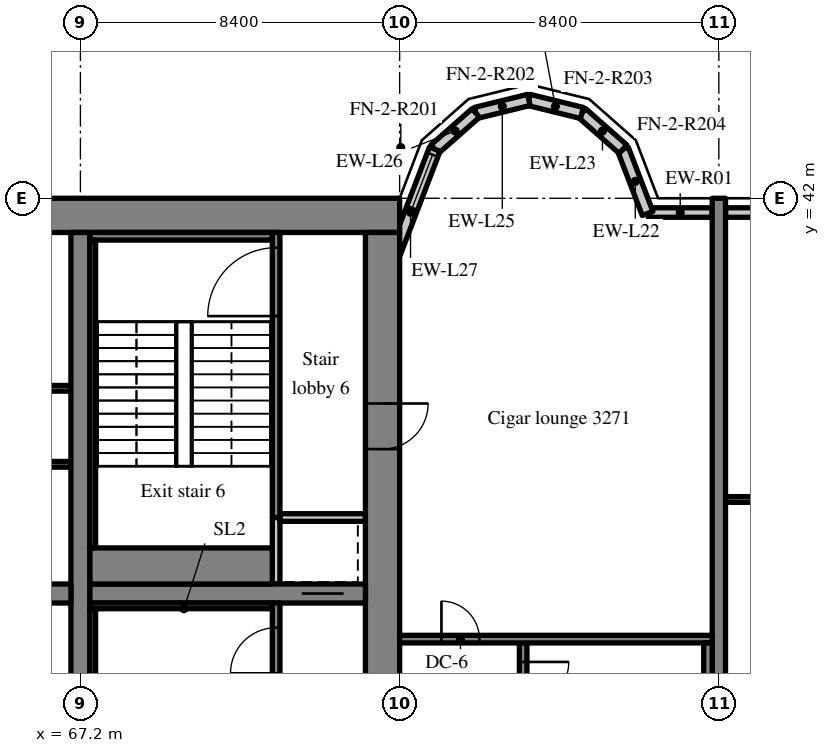
"""IFC4 building model, lengths in metres.
Left out: names, types, materials, properties, quantities, classifications, styles, units other than length and angle.
Written with IfcOpenShell. Run it as: python <this file> out.ifc"""

import sys

from ifc_helpers import new_model, si_unit, direction, frame, frame_2d, origin, place, context, subcontext, project, spatial, rectangle, extrude, source, transform, mapped, element, fill, save


model = new_model("IFC4")
c1 = context("Model", 3, precision=1e-05, world=origin(), true_north=direction((0.0, 1.0)))
c2 = subcontext(c1, "Body", "Model", "MODEL_VIEW")
j1 = project(units=[si_unit("LENGTHUNIT", "METRE"), si_unit("PLANEANGLEUNIT", "RADIAN")], contexts=[c1])
p1 = place(None, origin())
s1 = spatial("IfcSite", under=j1, at=p1, CompositionType="ELEMENT")
p2 = place(p1, origin())
s2 = spatial("IfcBuilding", under=s1, at=p2, CompositionType="ELEMENT")
p3 = place(p2, frame((0.0, 0.0, 133.2)))
s3 = spatial("IfcBuildingStorey", under=s2, at=p3, CompositionType="ELEMENT", Elevation=133.2)
m1 = source(origin(), c2, "Body", "SweptSolid", [
    extrude(rectangle(XDim=50.4, YDim=0.9, at=frame_2d((25.2, 0.0))), origin(), (0.0, 0.0, 1.0), 3.52),
])
p4 = place(p3, frame((25.2, 41.55, 0.0), z_axis=(0.0, 0.0, 1.0), x_axis=(1.0, 0.0, 0.0)))
e1 = element("IfcWall", 1, at=p4, inside=s3, PredefinedType="SHEAR", context=c2, shape_type="MappedRepresentation", body=[
    mapped(m1, transform((0.0, 0.0, 0.0), scale=1.0)),
])
m2 = source(origin(), c2, "Body", "SweptSolid", [
    extrude(rectangle(XDim=18.2, YDim=0.9, at=frame_2d((9.1, 0.0))), origin(), (0.0, 0.0, 1.0), 3.52),
])
p5 = place(p3, frame((75.15, 22.9, 0.0), z_axis=(0.0, 0.0, 1.0), x_axis=(0.0, 1.0, 0.0)))
e2 = element("IfcWall", 2, at=p5, inside=s3, PredefinedType="SHEAR", context=c2, shape_type="MappedRepresentation", body=[
    mapped(m2, transform((0.0, 0.0, 0.0), scale=1.0)),
])
m3 = source(origin(), c2, "Body", "SweptSolid", [
    extrude(rectangle(XDim=1.2, YDim=2.1, at=frame_2d((0.6, 1.05))), frame((0.0, 0.46, 0.0), z_axis=(0.0, -1.0, 0.0), x_axis=(1.0, 0.0, 0.0)), (0.0, 0.0, 1.0), 0.92),
])
p6 = place(p5, frame((12.5, 0.0, 0.0)))
e3 = element("IfcOpeningElement", 3, at=p6, cuts=e2, PredefinedType="OPENING", context=c2, shape_type="MappedRepresentation", body=[
    mapped(m3, transform((0.0, 0.0, 0.0), scale=1.0)),
])
m4 = source(origin(), c2, "Body", "SweptSolid", [
    extrude(rectangle(XDim=18.2, YDim=0.5, at=frame_2d((9.1, 0.0))), origin(), (0.0, 0.0, 1.0), 3.52),
])
p7 = place(p3, frame((67.2, 22.9, 0.0), z_axis=(0.0, 0.0, 1.0), x_axis=(0.0, 1.0, 0.0)))
e4 = element("IfcWall", 4, at=p7, inside=s3, PredefinedType="SHEAR", context=c2, shape_type="MappedRepresentation", body=[
    mapped(m4, transform((0.0, 0.0, 0.0), scale=1.0)),
])
m5 = source(origin(), c2, "Body", "SweptSolid", [
    extrude(rectangle(XDim=16.3, YDim=0.5, at=frame_2d((8.15, 0.0))), origin(), (0.0, 0.0, 1.0), 3.52),
])
p8 = place(p3, frame((50.65, 31.6, 0.0), z_axis=(0.0, 0.0, 1.0), x_axis=(1.0, 0.0, 0.0)))
e5 = element("IfcWall", 5, at=p8, inside=s3, PredefinedType="SHEAR", context=c2, shape_type="MappedRepresentation", body=[
    mapped(m5, transform((0.0, 0.0, 0.0), scale=1.0)),
])
m6 = source(origin(), c2, "Body", "SweptSolid", [
    extrude(rectangle(XDim=1.0, YDim=2.1, at=frame_2d((0.5, 1.05))), frame((0.0, 0.26, 0.0), z_axis=(0.0, -1.0, 0.0), x_axis=(1.0, 0.0, 0.0)), (0.0, 0.0, 1.0), 0.52),
])
p9 = place(p8, frame((0.575, 0.0, 0.0)))
e6 = element("IfcOpeningElement", 6, at=p9, cuts=e5, PredefinedType="OPENING", context=c2, shape_type="MappedRepresentation", body=[
    mapped(m6, transform((0.0, 0.0, 0.0), scale=1.0)),
])
m7 = source(origin(), c2, "Body", "SweptSolid", [
    extrude(rectangle(XDim=7.25, YDim=0.5, at=frame_2d((3.625, 0.0))), origin(), (0.0, 0.0, 1.0), 3.52),
])
p10 = place(p3, frame((67.45, 31.6, 0.0), z_axis=(0.0, 0.0, 1.0), x_axis=(1.0, 0.0, 0.0)))
e7 = element("IfcWall", 7, at=p10, inside=s3, PredefinedType="SHEAR", context=c2, shape_type="MappedRepresentation", body=[
    mapped(m7, transform((0.0, 0.0, 0.0), scale=1.0)),
])
m8 = source(origin(), c2, "Body", "SweptSolid", [
    extrude(rectangle(XDim=1.1, YDim=2.1, at=frame_2d((0.55, 1.05))), frame((0.0, 0.26, 0.0), z_axis=(0.0, -1.0, 0.0), x_axis=(1.0, 0.0, 0.0)), (0.0, 0.0, 1.0), 0.52),
])
p11 = place(p10, frame((5.575, 0.0, 0.0)))
e8 = element("IfcOpeningElement", 8, at=p11, cuts=e7, PredefinedType="OPENING", context=c2, shape_type="MappedRepresentation", body=[
    mapped(m8, transform((0.0, 0.0, 0.0), scale=1.0)),
])
m9 = source(origin(), c2, "Body", "SweptSolid", [
    extrude(rectangle(XDim=20.0, YDim=0.35, at=frame_2d((10.0, 0.0))), origin(), (0.0, 0.0, 1.0), 3.52),
])
p12 = place(p3, frame((84.0, 22.0, 0.0), z_axis=(0.0, 0.0, 1.0), x_axis=(0.0, 1.0, 0.0)))
e9 = element("IfcWall", 9, at=p12, inside=s3, PredefinedType="SHEAR", context=c2, shape_type="MappedRepresentation", body=[
    mapped(m9, transform((0.0, 0.0, 0.0), scale=1.0)),
])
m10 = source(origin(), c2, "Body", "SweptSolid", [
    extrude(rectangle(XDim=1.683, YDim=0.25, at=frame_2d((0.841, 0.0))), origin(), (0.0, 0.0, 1.0), 2.82),
])
p13 = place(p3, frame((83.825, 41.625, 0.0), z_axis=(0.0, 0.0, 1.0), x_axis=(-1.0, 0.0, 0.0)))
e10 = element("IfcWall", 10, at=p13, inside=s3, PredefinedType="SOLIDWALL", context=c2, shape_type="MappedRepresentation", body=[
    mapped(m10, transform((0.0, 0.0, 0.0), scale=1.0)),
])
m11 = source(origin(), c2, "Body", "SweptSolid", [
    extrude(rectangle(XDim=3.675, YDim=0.25, at=frame_2d((1.837, 0.0))), origin(), (0.0, 0.0, 1.0), 2.82),
])
p14 = place(p3, frame((87.85, 41.625, 0.0), z_axis=(0.0, 0.0, 1.0), x_axis=(-1.0, 0.0, 0.0)))
e11 = element("IfcWall", 11, at=p14, inside=s3, PredefinedType="SOLIDWALL", context=c2, shape_type="MappedRepresentation", body=[
    mapped(m11, transform((0.0, 0.0, 0.0), scale=1.0)),
])
m12 = source(origin(), c2, "Body", "SweptSolid", [
    extrude(rectangle(XDim=1.5, YDim=1.5, at=frame_2d((0.75, 0.75))), frame((0.0, 0.135, 0.0), z_axis=(0.0, -1.0, 0.0), x_axis=(1.0, 0.0, 0.0)), (0.0, 0.0, 1.0), 0.27),
])
p15 = place(p14, frame((1.087, 0.0, 0.9)))
e12 = element("IfcOpeningElement", 12, at=p15, cuts=e11, PredefinedType="OPENING", context=c2, shape_type="MappedRepresentation", body=[
    mapped(m12, transform((0.0, 0.0, 0.0), scale=1.0)),
])
m13 = source(origin(), c2, "Body", "SweptSolid", [
    extrude(rectangle(XDim=1.812, YDim=0.3, at=frame_2d((0.906, 0.0))), origin(), (0.0, 0.0, 1.0), 3.52),
])
p16 = place(p3, frame((82.125, 41.6, 0.0), z_axis=(0.0, 0.0, 1.0), x_axis=(-0.357877270961, 0.93376863244, 0.0)))
e13 = element("IfcWall", 13, at=p16, inside=s3, PredefinedType="SOLIDWALL", context=c2, shape_type="MappedRepresentation", body=[
    mapped(m13, transform((0.0, 0.0, 0.0), scale=1.0)),
])
m14 = source(origin(), c2, "Body", "SweptSolid", [
    extrude(rectangle(XDim=1.44, YDim=0.3, at=frame_2d((0.72, 0.0))), origin(), (0.0, 0.0, 1.0), 3.52),
])
p17 = place(p3, frame((81.477, 43.292, 0.0), z_axis=(0.0, 0.0, 1.0), x_axis=(-0.74957555648, 0.661918790432, 0.0)))
e14 = element("IfcWall", 14, at=p17, inside=s3, PredefinedType="SOLIDWALL", context=c2, shape_type="MappedRepresentation", body=[
    mapped(m14, transform((0.0, 0.0, 0.0), scale=1.0)),
])
m15 = source(origin(), c2, "Body", "SweptSolid", [
    extrude(rectangle(XDim=1.439, YDim=0.3, at=frame_2d((0.719, 0.0))), origin(), (0.0, 0.0, 1.0), 3.52),
])
for number, where, z_axis, x_axis in (
    (15, (80.397, 44.245, 0.0), (0.0, 0.0, 1.0), (-0.971, 0.238, 0.0)),
    (16, (79.0, 44.588, 0.0), (0.0, 0.0, 1.0), (-0.971, -0.238, 0.0)),
):
    element("IfcWall", number, at=place(p3, frame(where, z_axis=z_axis, x_axis=x_axis)), inside=s3, PredefinedType="SOLIDWALL", context=c2, shape_type="MappedRepresentation", body=[
        mapped(m15, transform((0.0, 0.0, 0.0), scale=1.0)),
    ])
p18 = place(p3, frame((77.603, 44.245, 0.0), z_axis=(0.0, 0.0, 1.0), x_axis=(-0.74957555648, -0.661918790432, 0.0)))
e17 = element("IfcWall", 17, at=p18, inside=s3, PredefinedType="SOLIDWALL", context=c2, shape_type="MappedRepresentation", body=[
    mapped(m14, transform((0.0, 0.0, 0.0), scale=1.0)),
])
m16 = source(origin(), c2, "Body", "SweptSolid", [
    extrude(rectangle(XDim=3.559, YDim=0.3, at=frame_2d((1.78, 0.0))), origin(), (0.0, 0.0, 1.0), 3.52),
])
p19 = place(p3, frame((76.523, 43.292, 0.0), z_axis=(0.0, 0.0, 1.0), x_axis=(-0.35779745313, -0.933799219604, 0.0)))
e18 = element("IfcWall", 18, at=p19, inside=s3, PredefinedType="SOLIDWALL", context=c2, shape_type="MappedRepresentation", body=[
    mapped(m16, transform((0.0, 0.0, 0.0), scale=1.0)),
])
m17 = source(origin(), c2, "Body", "SweptSolid", [
    extrude(rectangle(XDim=1.5, YDim=2.0, at=frame_2d((0.75, 1.0))), frame((0.0, 0.16, 0.0), z_axis=(0.0, -1.0, 0.0), x_axis=(1.0, 0.0, 0.0)), (0.0, 0.0, 1.0), 0.32),
])
p20 = place(p19, frame((0.156, 0.0, 0.9)))
e19 = element("IfcOpeningElement", 19, at=p20, cuts=e18, PredefinedType="OPENING", context=c2, shape_type="MappedRepresentation", body=[
    mapped(m17, transform((0.0, 0.0, 0.0), scale=1.0)),
])
m18 = source(origin(), c2, "Body", "SweptSolid", [
    extrude(rectangle(XDim=14.15, YDim=0.15, at=frame_2d((7.075, 0.0))), origin(), (0.0, 0.0, 1.0), 3.52),
])
p21 = place(p3, frame((66.95, 35.0, 0.0), z_axis=(0.0, 0.0, 1.0), x_axis=(-1.0, 0.0, 0.0)))
e20 = element("IfcWall", 20, at=p21, inside=s3, PredefinedType="PARTITIONING", context=c2, shape_type="MappedRepresentation", body=[
    mapped(m18, transform((0.0, 0.0, 0.0), scale=1.0)),
])
m19 = source(origin(), c2, "Body", "SweptSolid", [
    extrude(rectangle(XDim=0.9, YDim=2.1, at=frame_2d((0.45, 1.05))), frame((0.0, 0.085, 0.0), z_axis=(0.0, -1.0, 0.0), x_axis=(1.0, 0.0, 0.0)), (0.0, 0.0, 1.0), 0.17),
])
p22 = place(p21, frame((0.958, 0.0, 0.0)))
e21 = element("IfcOpeningElement", 21, at=p22, cuts=e20, PredefinedType="OPENING", context=c2, shape_type="MappedRepresentation", body=[
    mapped(m19, transform((0.0, 0.0, 0.0), scale=1.0)),
])
p23 = place(p21, frame((5.884, 0.0, 0.0)))
e22 = element("IfcOpeningElement", 22, at=p23, cuts=e20, PredefinedType="OPENING", context=c2, shape_type="MappedRepresentation", body=[
    mapped(m19, transform((0.0, 0.0, 0.0), scale=1.0)),
])
p24 = place(p21, frame((11.514, 0.0, 0.0)))
e23 = element("IfcOpeningElement", 23, at=p24, cuts=e20, PredefinedType="OPENING", context=c2, shape_type="MappedRepresentation", body=[
    mapped(m19, transform((0.0, 0.0, 0.0), scale=1.0)),
])
m20 = source(origin(), c2, "Body", "SweptSolid", [
    extrude(rectangle(XDim=16.3, YDim=0.15, at=frame_2d((8.15, 0.0))), origin(), (0.0, 0.0, 1.0), 3.52),
])
p25 = place(p3, frame((66.95, 37.0, 0.0), z_axis=(0.0, 0.0, 1.0), x_axis=(-1.0, 0.0, 0.0)))
e24 = element("IfcWall", 24, at=p25, inside=s3, PredefinedType="PARTITIONING", context=c2, shape_type="MappedRepresentation", body=[
    mapped(m20, transform((0.0, 0.0, 0.0), scale=1.0)),
])
p26 = place(p25, frame((0.773, 0.0, 0.0)))
e25 = element("IfcOpeningElement", 25, at=p26, cuts=e24, PredefinedType="OPENING", context=c2, shape_type="MappedRepresentation", body=[
    mapped(m19, transform((0.0, 0.0, 0.0), scale=1.0)),
])
p27 = place(p25, frame((3.625, 0.0, 0.0)))
e26 = element("IfcOpeningElement", 26, at=p27, cuts=e24, PredefinedType="OPENING", context=c2, shape_type="MappedRepresentation", body=[
    mapped(m19, transform((0.0, 0.0, 0.0), scale=1.0)),
])
p28 = place(p25, frame((9.33, 0.0, 0.0)))
e27 = element("IfcOpeningElement", 27, at=p28, cuts=e24, PredefinedType="OPENING", context=c2, shape_type="MappedRepresentation", body=[
    mapped(m19, transform((0.0, 0.0, 0.0), scale=1.0)),
])
p29 = place(p25, frame((14.627, 0.0, 0.0)))
e28 = element("IfcOpeningElement", 28, at=p29, cuts=e24, PredefinedType="OPENING", context=c2, shape_type="MappedRepresentation", body=[
    mapped(m19, transform((0.0, 0.0, 0.0), scale=1.0)),
])
m21 = source(origin(), c2, "Body", "SweptSolid", [
    extrude(rectangle(XDim=8.45, YDim=0.2, at=frame_2d((4.225, 0.0))), origin(), (0.0, 0.0, 1.0), 3.52),
])
p30 = place(p3, frame((72.35, 22.9, 0.0), z_axis=(0.0, 0.0, 1.0), x_axis=(0.0, 1.0, 0.0)))
e29 = element("IfcWall", 29, at=p30, inside=s3, PredefinedType="SOLIDWALL", context=c2, shape_type="MappedRepresentation", body=[
    mapped(m21, transform((0.0, 0.0, 0.0), scale=1.0)),
])
m22 = source(origin(), c2, "Body", "SweptSolid", [
    extrude(rectangle(XDim=1.2, YDim=2.1, at=frame_2d((0.6, 1.05))), frame((0.0, 0.11, 0.0), z_axis=(0.0, -1.0, 0.0), x_axis=(1.0, 0.0, 0.0)), (0.0, 0.0, 1.0), 0.22),
])
p31 = place(p30, frame((6.6, 0.0, 0.0)))
e30 = element("IfcOpeningElement", 30, at=p31, cuts=e29, PredefinedType="OPENING", context=c2, shape_type="MappedRepresentation", body=[
    mapped(m22, transform((0.0, 0.0, 0.0), scale=1.0)),
])
m23 = source(origin(), c2, "Body", "SweptSolid", [
    extrude(rectangle(XDim=1.75, YDim=0.2, at=frame_2d((0.875, 0.0))), origin(), (0.0, 0.0, 1.0), 3.52),
])
p32 = place(p3, frame((72.35, 31.85, 0.0), z_axis=(0.0, 0.0, 1.0), x_axis=(0.0, 1.0, 0.0)))
e31 = element("IfcWall", 31, at=p32, inside=s3, PredefinedType="SOLIDWALL", context=c2, shape_type="MappedRepresentation", body=[
    mapped(m23, transform((0.0, 0.0, 0.0), scale=1.0)),
])
m24 = source(origin(), c2, "Body", "SweptSolid", [
    extrude(rectangle(XDim=2.25, YDim=0.2, at=frame_2d((1.125, 0.0))), origin(), (0.0, 0.0, 1.0), 3.52),
])
p33 = place(p3, frame((72.45, 33.6, 0.0), z_axis=(0.0, 0.0, 1.0), x_axis=(1.0, 0.0, 0.0)))
e32 = element("IfcWall", 32, at=p33, inside=s3, PredefinedType="SOLIDWALL", context=c2, shape_type="MappedRepresentation", body=[
    mapped(m24, transform((0.0, 0.0, 0.0), scale=1.0)),
])
m25 = source(origin(), c2, "Body", "SweptSolid", [
    extrude(rectangle(XDim=7.5, YDim=0.2, at=frame_2d((3.75, 0.0))), origin(), (0.0, 0.0, 1.0), 3.52),
])
p34 = place(p3, frame((72.35, 33.6, 0.0), z_axis=(0.0, 0.0, 1.0), x_axis=(0.0, 1.0, 0.0)))
e33 = element("IfcWall", 33, at=p34, inside=s3, PredefinedType="SOLIDWALL", context=c2, shape_type="MappedRepresentation", body=[
    mapped(m25, transform((0.0, 0.0, 0.0), scale=1.0)),
])
m26 = source(origin(), c2, "Body", "SweptSolid", [
    extrude(rectangle(XDim=1.8, YDim=2.1, at=frame_2d((0.9, 1.05))), frame((0.0, 0.11, 0.0), z_axis=(0.0, -1.0, 0.0), x_axis=(1.0, 0.0, 0.0)), (0.0, 0.0, 1.0), 0.22),
])
p35 = place(p34, frame((5.3, 0.0, 0.0)))
e34 = element("IfcOpeningElement", 34, at=p35, cuts=e33, PredefinedType="OPENING", context=c2, shape_type="MappedRepresentation", body=[
    mapped(m26, transform((0.0, 0.0, 0.0), scale=1.0)),
])
m27 = source(origin(), c2, "Body", "SweptSolid", [
    extrude(rectangle(XDim=8.3, YDim=0.2, at=frame_2d((4.15, 0.0))), origin(), (0.0, 0.0, 1.0), 3.52),
])
p36 = place(p3, frame((78.85, 22.1, 0.0), z_axis=(0.0, 0.0, 1.0), x_axis=(0.0, 1.0, 0.0)))
e35 = element("IfcWall", 35, at=p36, inside=s3, PredefinedType="SOLIDWALL", context=c2, shape_type="MappedRepresentation", body=[
    mapped(m27, transform((0.0, 0.0, 0.0), scale=1.0)),
])
p37 = place(p36, frame((6.5, 0.0, 0.0)))
e36 = element("IfcOpeningElement", 36, at=p37, cuts=e35, PredefinedType="OPENING", context=c2, shape_type="MappedRepresentation", body=[
    mapped(m22, transform((0.0, 0.0, 0.0), scale=1.0)),
])
m28 = source(origin(), c2, "Body", "SweptSolid", [
    extrude(rectangle(XDim=8.225, YDim=0.2, at=frame_2d((4.112, 0.0))), origin(), (0.0, 0.0, 1.0), 3.52),
])
p38 = place(p3, frame((83.825, 30.4, 0.0), z_axis=(0.0, 0.0, 1.0), x_axis=(-1.0, 0.0, 0.0)))
e37 = element("IfcWall", 37, at=p38, inside=s3, PredefinedType="SOLIDWALL", context=c2, shape_type="MappedRepresentation", body=[
    mapped(m28, transform((0.0, 0.0, 0.0), scale=1.0)),
])
m29 = source(origin(), c2, "Body", "SweptSolid", [
    extrude(rectangle(XDim=1.0, YDim=2.1, at=frame_2d((0.5, 1.05))), frame((0.0, 0.11, 0.0), z_axis=(0.0, -1.0, 0.0), x_axis=(1.0, 0.0, 0.0)), (0.0, 0.0, 1.0), 0.22),
])
p39 = place(p38, frame((6.125, 0.0, 0.0)))
e38 = element("IfcOpeningElement", 38, at=p39, cuts=e37, PredefinedType="OPENING", context=c2, shape_type="MappedRepresentation", body=[
    mapped(m29, transform((0.0, 0.0, 0.0), scale=1.0)),
])
m30 = source(origin(), c2, "Body", "SweptSolid", [
    extrude(rectangle(XDim=4.8, YDim=0.15, at=frame_2d((2.4, 0.0))), origin(), (0.0, 0.0, 1.0), 3.52),
])
p40 = place(p3, frame((67.45, 31.275, 0.0), z_axis=(0.0, 0.0, 1.0), x_axis=(1.0, 0.0, 0.0)))
e39 = element("IfcWall", 39, at=p40, inside=s3, PredefinedType="SOLIDWALL", context=c2, shape_type="MappedRepresentation", body=[
    mapped(m30, transform((0.0, 0.0, 0.0), scale=1.0)),
])
m31 = source(origin(), c2, "Body", "SweptSolid", [
    extrude(rectangle(XDim=8.1, YDim=0.15, at=frame_2d((4.05, 0.0))), origin(), (0.0, 0.0, 1.0), 3.52),
])
p41 = place(p3, frame((67.525, 23.1, 0.0), z_axis=(0.0, 0.0, 1.0), x_axis=(0.0, 1.0, 0.0)))
e40 = element("IfcWall", 40, at=p41, inside=s3, PredefinedType="SOLIDWALL", context=c2, shape_type="MappedRepresentation", body=[
    mapped(m31, transform((0.0, 0.0, 0.0), scale=1.0)),
])
m32 = source(origin(), c2, "Body", "SweptSolid", [
    extrude(rectangle(XDim=4.8, YDim=0.2, at=frame_2d((2.4, 0.0))), origin(), (0.0, 0.0, 1.0), 3.52),
])
p42 = place(p3, frame((67.45, 41.0, 0.0), z_axis=(0.0, 0.0, 1.0), x_axis=(1.0, 0.0, 0.0)))
e41 = element("IfcWall", 41, at=p42, inside=s3, PredefinedType="SOLIDWALL", context=c2, shape_type="MappedRepresentation", body=[
    mapped(m32, transform((0.0, 0.0, 0.0), scale=1.0)),
])
m33 = source(origin(), c2, "Body", "SweptSolid", [
    extrude(rectangle(XDim=4.8, YDim=0.95, at=frame_2d((2.4, 0.0))), origin(), (0.0, 0.0, 1.0), 3.52),
])
p43 = place(p3, frame((67.45, 32.325, 0.0), z_axis=(0.0, 0.0, 1.0), x_axis=(1.0, 0.0, 0.0)))
e42 = element("IfcWall", 42, at=p43, inside=s3, PredefinedType="SOLIDWALL", context=c2, shape_type="MappedRepresentation", body=[
    mapped(m33, transform((0.0, 0.0, 0.0), scale=1.0)),
])
p44 = place(p3, frame((67.525, 32.8, 0.0), z_axis=(0.0, 0.0, 1.0), x_axis=(0.0, 1.0, 0.0)))
e43 = element("IfcWall", 43, at=p44, inside=s3, PredefinedType="SOLIDWALL", context=c2, shape_type="MappedRepresentation", body=[
    mapped(m31, transform((0.0, 0.0, 0.0), scale=1.0)),
])
m34 = source(origin(), c2, "Body", "SweptSolid", [
    extrude(rectangle(XDim=8.1, YDim=0.225, at=frame_2d((4.05, 0.0))), origin(), (0.0, 0.0, 1.0), 3.52),
])
p45 = place(p3, frame((83.713, 22.2, 0.0), z_axis=(0.0, 0.0, 1.0), x_axis=(0.0, 1.0, 0.0)))
e44 = element("IfcWall", 44, at=p45, inside=s3, PredefinedType="SOLIDWALL", context=c2, shape_type="MappedRepresentation", body=[
    mapped(m34, transform((0.0, 0.0, 0.0), scale=1.0)),
])
m35 = source(origin(), c2, "Body", "SweptSolid", [
    extrude(rectangle(XDim=8.05, YDim=0.15, at=frame_2d((4.025, 0.0))), origin(), (0.0, 0.0, 1.0), 3.52),
])
p46 = place(p3, frame((84.175, 34.075, 0.0), z_axis=(0.0, 0.0, 1.0), x_axis=(1.0, 0.0, 0.0)))
e45 = element("IfcWall", 45, at=p46, inside=s3, PredefinedType="PARTITIONING", context=c2, shape_type="MappedRepresentation", body=[
    mapped(m35, transform((0.0, 0.0, 0.0), scale=1.0)),
])
m36 = source(origin(), c2, "Body", "SweptSolid", [
    extrude(rectangle(XDim=1.0, YDim=2.1, at=frame_2d((0.5, 1.05))), frame((0.0, 0.085, 0.0), z_axis=(0.0, -1.0, 0.0), x_axis=(1.0, 0.0, 0.0)), (0.0, 0.0, 1.0), 0.17),
])
p47 = place(p46, frame((0.7, 0.0, 0.0)))
e46 = element("IfcOpeningElement", 46, at=p47, cuts=e45, PredefinedType="OPENING", context=c2, shape_type="MappedRepresentation", body=[
    mapped(m36, transform((0.0, 0.0, 0.0), scale=1.0)),
])
m37 = source(origin(), c2, "Body", "SweptSolid", [
    extrude(rectangle(XDim=1.5, YDim=2.0, at=frame_2d((0.75, 1.0))), frame((0.0, 0.03, 0.0), z_axis=(0.0, -1.0, 0.0), x_axis=(1.0, 0.0, 0.0)), (0.0, 0.0, 1.0), 0.06),
])
p48 = place(p20, origin())
e47 = element("IfcWindow", 47, at=p48, inside=s3, PartitioningType="SINGLE_PANEL", PredefinedType="WINDOW", context=c2, shape_type="MappedRepresentation", body=[
    mapped(m37, transform((0.0, 0.0, 0.0), scale=1.0)),
])
fill(e19, e47)
m38 = source(origin(), c2, "Body", "SweptSolid", [
    extrude(rectangle(XDim=1.2, YDim=2.1, at=frame_2d((0.6, 1.05))), frame((0.0, 0.025, 0.0), z_axis=(0.0, -1.0, 0.0), x_axis=(1.0, 0.0, 0.0)), (0.0, 0.0, 1.0), 0.05),
])
p49 = place(p31, origin())
e48 = element("IfcDoor", 48, at=p49, inside=s3, OperationType="SINGLE_SWING_LEFT", PredefinedType="DOOR", context=c2, shape_type="MappedRepresentation", body=[
    mapped(m38, transform((0.0, 0.0, 0.0), scale=1.0)),
])
fill(e30, e48)
m39 = source(origin(), c2, "Body", "SweptSolid", [
    extrude(rectangle(XDim=1.1, YDim=2.1, at=frame_2d((0.55, 1.05))), frame((0.0, 0.025, 0.0), z_axis=(0.0, -1.0, 0.0), x_axis=(1.0, 0.0, 0.0)), (0.0, 0.0, 1.0), 0.05),
])
p50 = place(p11, origin())
e49 = element("IfcDoor", 49, at=p50, inside=s3, OperationType="SLIDING_TO_RIGHT", PredefinedType="DOOR", context=c2, shape_type="MappedRepresentation", body=[
    mapped(m39, transform((0.0, 0.0, 0.0), scale=1.0)),
])
fill(e8, e49)
m40 = source(origin(), c2, "Body", "SweptSolid", [
    extrude(rectangle(XDim=1.8, YDim=2.1, at=frame_2d((0.9, 1.05))), frame((0.0, 0.025, 0.0), z_axis=(0.0, -1.0, 0.0), x_axis=(1.0, 0.0, 0.0)), (0.0, 0.0, 1.0), 0.05),
])
p51 = place(p35, origin())
e50 = element("IfcDoor", 50, at=p51, inside=s3, OperationType="SINGLE_SWING_LEFT", PredefinedType="DOOR", context=c2, shape_type="MappedRepresentation", body=[
    mapped(m40, transform((0.0, 0.0, 0.0), scale=1.0)),
])
fill(e34, e50)
p52 = place(p6, origin())
e51 = element("IfcDoor", 51, at=p52, inside=s3, OperationType="SINGLE_SWING_RIGHT", PredefinedType="DOOR", context=c2, shape_type="MappedRepresentation", body=[
    mapped(m38, transform((0.0, 0.0, 0.0), scale=1.0)),
])
fill(e3, e51)
p53 = place(p37, origin())
e52 = element("IfcDoor", 52, at=p53, inside=s3, OperationType="SINGLE_SWING_RIGHT", PredefinedType="DOOR", context=c2, shape_type="MappedRepresentation", body=[
    mapped(m38, transform((0.0, 0.0, 0.0), scale=1.0)),
])
fill(e36, e52)
m41 = source(origin(), c2, "Body", "SweptSolid", [
    extrude(rectangle(XDim=1.0, YDim=2.1, at=frame_2d((0.5, 1.05))), frame((0.0, 0.025, 0.0), z_axis=(0.0, -1.0, 0.0), x_axis=(1.0, 0.0, 0.0)), (0.0, 0.0, 1.0), 0.05),
])
p54 = place(p39, origin())
e53 = element("IfcDoor", 53, at=p54, inside=s3, OperationType="SINGLE_SWING_RIGHT", PredefinedType="DOOR", context=c2, shape_type="MappedRepresentation", body=[
    mapped(m41, transform((0.0, 0.0, 0.0), scale=1.0)),
])
fill(e38, e53)
save(model, sys.argv[1])
